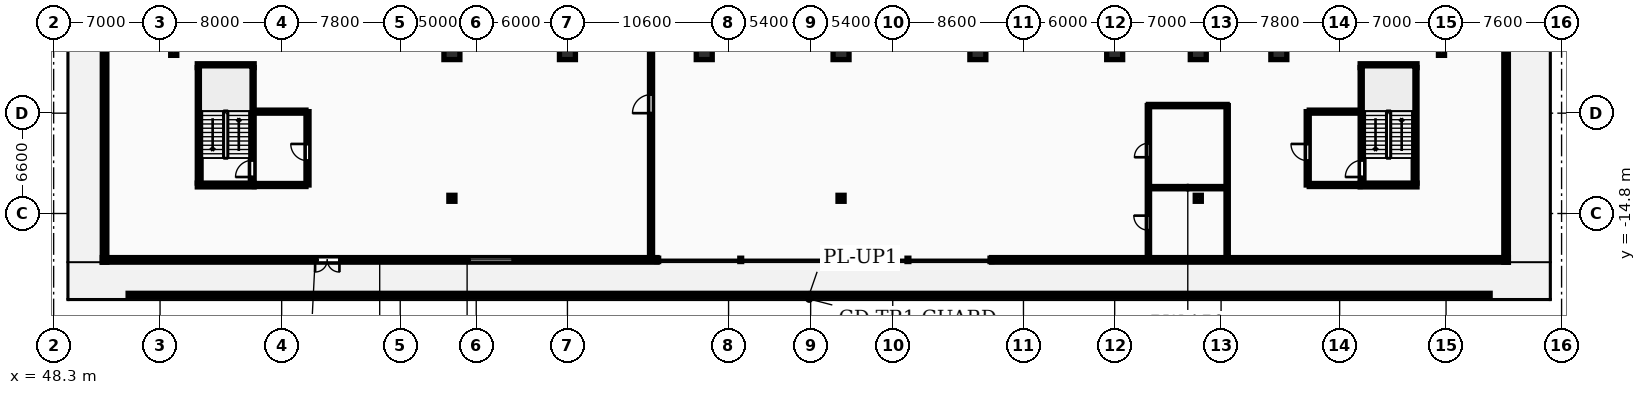
"""IFC4 building model, lengths in metres.
Left out: names, types, materials, properties, quantities, classifications, styles, units other than length and angle.
Written with IfcOpenShell. Run it as: python <this file> out.ifc"""

import sys

from ifc_helpers import new_model, si_unit, direction, frame, frame_2d, origin, origin_2d, place, context, subcontext, project, spatial, rectangle, i_section, extrude, element, fill, save


model = new_model("IFC4")
c1 = context("Model", 3, precision=1e-05, world=origin(), true_north=direction((0.0, 1.0)))
c2 = subcontext(c1, "Body", "Model", "MODEL_VIEW")
j1 = project(units=[si_unit("LENGTHUNIT", "METRE"), si_unit("PLANEANGLEUNIT", "RADIAN")], contexts=[c1])
p1 = place(None, origin())
s1 = spatial("IfcSite", under=j1, at=p1, CompositionType="ELEMENT")
p2 = place(p1, origin())
s2 = spatial("IfcBuilding", under=s1, at=p2, CompositionType="ELEMENT")
p3 = place(p2, frame((0.0, 0.0, 14.5)))
s3 = spatial("IfcBuildingStorey", under=s2, at=p3, CompositionType="ELEMENT", Elevation=14.5)
for number, where, z_axis, x_axis in (
    (1, (74.5, -4.2, 0.0), (0.0, 0.0, 1.0), (1.0, 0.0, 0.0)),
    (2, (82.1, -4.2, 0.0), (0.0, 0.0, 1.0), (1.0, 0.0, 0.0)),
    (3, (91.1, -4.2, 0.0), (0.0, 0.0, 1.0), (1.0, 0.0, 0.0)),
    (4, (100.1, -4.2, 0.0), (0.0, 0.0, 1.0), (1.0, 0.0, 0.0)),
    (5, (109.1, -4.2, 0.0), (0.0, 0.0, 1.0), (1.0, 0.0, 0.0)),
    (6, (118.1, -4.2, 0.0), (0.0, 0.0, 1.0), (1.0, 0.0, 0.0)),
    (7, (123.6, -4.2, 0.0), (0.0, 0.0, 1.0), (1.0, 0.0, 0.0)),
    (8, (128.9, -4.2, 0.0), (0.0, 0.0, 1.0), (1.0, 0.0, 0.0)),
):
    element("IfcColumn", number, at=place(p3, frame(where, z_axis=z_axis, x_axis=x_axis)), inside=s3, PredefinedType="COLUMN", context=c2, shape_type="SweptSolid", body=[
        extrude(rectangle(XDim=1.05, YDim=0.95, at=origin_2d()), origin(), (0.0, 0.0, 1.0), 4.5),
    ])
for number, where, z_axis, x_axis in (
    (9, (56.2, -4.2, 0.0), (0.0, 0.0, 1.0), (1.0, 0.0, 0.0)),
    (10, (139.6, -4.2, 0.0), (0.0, 0.0, 1.0), (1.0, 0.0, 0.0)),
    (11, (74.5, -13.8, 0.0), (0.0, 0.0, 1.0), (1.0, 0.0, 0.0)),
    (12, (100.1, -13.8, 0.0), (0.0, 0.0, 1.0), (1.0, 0.0, 0.0)),
    (13, (123.6, -13.8, 0.0), (0.0, 0.0, 1.0), (1.0, 0.0, 0.0)),
):
    element("IfcColumn", number, at=place(p3, frame(where, z_axis=z_axis, x_axis=x_axis)), inside=s3, PredefinedType="COLUMN", context=c2, shape_type="SweptSolid", body=[
        extrude(i_section(OverallWidth=0.399, OverallDepth=0.394, WebThickness=0.023, FlangeThickness=0.037, FilletRadius=0.015, at=origin_2d()), origin(), (0.0, 0.0, 1.0), 4.5),
    ])
p4 = place(p3, frame((51.5, -17.85, 0.0), z_axis=(0.0, 0.0, 1.0), x_axis=(1.0, 0.0, 0.0)))
e14 = element("IfcWall", 14, at=p4, inside=s3, PredefinedType="STANDARD", context=c2, shape_type="SweptSolid", body=[
    extrude(rectangle(XDim=36.5, YDim=0.3, at=frame_2d((18.25, 0.0))), origin(), (0.0, 0.0, 1.0), 4.18),
])
p5 = place(p4, frame((14.0, 0.0, 0.0)))
e15 = element("IfcOpeningElement", 15, at=p5, cuts=e14, PredefinedType="OPENING", context=c2, shape_type="SweptSolid", body=[
    extrude(rectangle(XDim=1.6, YDim=2.2, at=frame_2d((0.8, 1.1))), frame((0.0, 0.16, 0.0), z_axis=(0.0, -1.0, 0.0), x_axis=(1.0, 0.0, 0.0)), (0.0, 0.0, 1.0), 0.32),
])
p6 = place(p4, frame((24.0, 0.0, 0.9)))
e16 = element("IfcOpeningElement", 16, at=p6, cuts=e14, PredefinedType="OPENING", context=c2, shape_type="SweptSolid", body=[
    extrude(rectangle(XDim=3.0, YDim=2.6, at=frame_2d((1.5, 1.3))), frame((0.0, 0.16, 0.0), z_axis=(0.0, -1.0, 0.0), x_axis=(1.0, 0.0, 0.0)), (0.0, 0.0, 1.0), 0.32),
])
p7 = place(p3, frame((110.0, -17.85, 0.0), z_axis=(0.0, 0.0, 1.0), x_axis=(1.0, 0.0, 0.0)))
e17 = element("IfcWall", 17, at=p7, inside=s3, PredefinedType="STANDARD", context=c2, shape_type="SweptSolid", body=[
    extrude(rectangle(XDim=34.0, YDim=0.3, at=frame_2d((17.0, 0.0))), origin(), (0.0, 0.0, 1.0), 4.18),
])
p8 = place(p3, frame((51.65, 101.7, 0.0), z_axis=(0.0, 0.0, 1.0), x_axis=(0.0, -1.0, 0.0)))
e18 = element("IfcWall", 18, at=p8, inside=s3, PredefinedType="STANDARD", context=c2, shape_type="SweptSolid", body=[
    extrude(rectangle(XDim=119.7, YDim=0.3, at=frame_2d((59.85, 0.0))), origin(), (0.0, 0.0, 1.0), 4.18),
])
p9 = place(p8, frame((12.0, 0.0, 0.0)))
e19 = element("IfcOpeningElement", 19, at=p9, cuts=e18, PredefinedType="OPENING", context=c2, shape_type="SweptSolid", body=[
    extrude(rectangle(XDim=1.6, YDim=2.2, at=frame_2d((0.8, 1.1))), frame((0.0, 0.16, 0.0), z_axis=(0.0, -1.0, 0.0), x_axis=(1.0, 0.0, 0.0)), (0.0, 0.0, 1.0), 0.32),
])
p10 = place(p3, frame((143.85, -18.0, 0.0), z_axis=(0.0, 0.0, 1.0), x_axis=(0.0, 1.0, 0.0)))
e20 = element("IfcWall", 20, at=p10, inside=s3, PredefinedType="STANDARD", context=c2, shape_type="SweptSolid", body=[
    extrude(rectangle(XDim=119.7, YDim=0.3, at=frame_2d((59.85, 0.0))), origin(), (0.0, 0.0, 1.0), 4.18),
])
p11 = place(p10, frame((20.0, 0.0, 0.0)))
e21 = element("IfcOpeningElement", 21, at=p11, cuts=e20, PredefinedType="OPENING", context=c2, shape_type="SweptSolid", body=[
    extrude(rectangle(XDim=1.6, YDim=2.2, at=frame_2d((0.8, 1.1))), frame((0.0, 0.16, 0.0), z_axis=(0.0, -1.0, 0.0), x_axis=(1.0, 0.0, 0.0)), (0.0, 0.0, 1.0), 0.32),
])
p12 = place(p3, frame((53.2, -20.15, 0.0), z_axis=(0.0, 0.0, 1.0), x_axis=(1.0, 0.0, 0.0)))
e22 = element("IfcWall", 22, at=p12, inside=s3, PredefinedType="PARAPET", context=c2, shape_type="SweptSolid", body=[
    extrude(rectangle(XDim=89.6, YDim=0.2, at=frame_2d((44.8, 0.0))), origin(), (0.0, 0.0, 1.0), 0.65),
])
p13 = place(p3, frame((57.875, -12.8, 0.0), z_axis=(0.0, 0.0, 1.0), x_axis=(0.0, 1.0, 0.0)))
e23 = element("IfcWall", 23, at=p13, inside=s3, PredefinedType="SHEAR", context=c2, shape_type="SweptSolid", body=[
    extrude(rectangle(XDim=7.6, YDim=0.25, at=frame_2d((3.8, 0.0))), origin(), (0.0, 0.0, 1.0), 4.5),
])
for number, where, z_axis, x_axis in (
    (24, (57.75, -12.925, 0.0), (0.0, 0.0, 1.0), (1.0, 0.0, 0.0)),
    (25, (57.75, -5.075, 0.0), (0.0, 0.0, 1.0), (1.0, 0.0, 0.0)),
):
    element("IfcWall", number, at=place(p3, frame(where, z_axis=z_axis, x_axis=x_axis)), inside=s3, PredefinedType="SHEAR", context=c2, shape_type="SweptSolid", body=[
        extrude(rectangle(XDim=3.74, YDim=0.25, at=frame_2d((1.87, 0.0))), origin(), (0.0, 0.0, 1.0), 4.5),
    ])
p14 = place(p3, frame((61.365, -12.8, 0.0), z_axis=(0.0, 0.0, 1.0), x_axis=(0.0, 1.0, 0.0)))
e26 = element("IfcWall", 26, at=p14, inside=s3, PredefinedType="SHEAR", context=c2, shape_type="SweptSolid", body=[
    extrude(rectangle(XDim=7.6, YDim=0.25, at=frame_2d((3.8, 0.0))), origin(), (0.0, 0.0, 1.0), 4.5),
])
p15 = place(p14, frame((0.4, 0.0, 0.0)))
e27 = element("IfcOpeningElement", 27, at=p15, cuts=e26, PredefinedType="OPENING", context=c2, shape_type="SweptSolid", body=[
    extrude(rectangle(XDim=1.1, YDim=2.1, at=frame_2d((0.55, 1.05))), frame((0.0, 0.135, 0.0), z_axis=(0.0, -1.0, 0.0), x_axis=(1.0, 0.0, 0.0)), (0.0, 0.0, 1.0), 0.27),
])
p16 = place(p3, frame((65.0, -12.925, 0.0), z_axis=(0.0, 0.0, 1.0), x_axis=(0.0, 1.0, 0.0)))
e28 = element("IfcWall", 28, at=p16, inside=s3, PredefinedType="PARTITIONING", context=c2, shape_type="SweptSolid", body=[
    extrude(rectangle(XDim=4.825, YDim=0.2, at=frame_2d((2.413, 0.0))), origin(), (0.0, 0.0, 1.0), 4.18),
])
p17 = place(p16, frame((1.6, 0.0, 0.0)))
e29 = element("IfcOpeningElement", 29, at=p17, cuts=e28, PredefinedType="OPENING", context=c2, shape_type="SweptSolid", body=[
    extrude(rectangle(XDim=1.1, YDim=2.15, at=frame_2d((0.55, 1.075))), frame((0.0, 0.11, 0.0), z_axis=(0.0, -1.0, 0.0), x_axis=(1.0, 0.0, 0.0)), (0.0, 0.0, 1.0), 0.22),
])
for number, where, z_axis, x_axis in (
    (30, (61.5, -12.925, 0.0), (0.0, 0.0, 1.0), (1.0, 0.0, 0.0)),
    (31, (61.5, -8.1, 0.0), (0.0, 0.0, 1.0), (1.0, 0.0, 0.0)),
):
    element("IfcWall", number, at=place(p3, frame(where, z_axis=z_axis, x_axis=x_axis)), inside=s3, PredefinedType="PARTITIONING", context=c2, shape_type="SweptSolid", body=[
        extrude(rectangle(XDim=3.4, YDim=0.2, at=frame_2d((1.7, 0.0))), origin(), (0.0, 0.0, 1.0), 4.18),
    ])
p18 = place(p3, frame((134.375, -12.8, 0.0), z_axis=(0.0, 0.0, 1.0), x_axis=(0.0, 1.0, 0.0)))
e32 = element("IfcWall", 32, at=p18, inside=s3, PredefinedType="SHEAR", context=c2, shape_type="SweptSolid", body=[
    extrude(rectangle(XDim=7.6, YDim=0.25, at=frame_2d((3.8, 0.0))), origin(), (0.0, 0.0, 1.0), 4.5),
])
p19 = place(p18, frame((0.4, 0.0, 0.0)))
e33 = element("IfcOpeningElement", 33, at=p19, cuts=e32, PredefinedType="OPENING", context=c2, shape_type="SweptSolid", body=[
    extrude(rectangle(XDim=1.1, YDim=2.1, at=frame_2d((0.55, 1.05))), frame((0.0, 0.135, 0.0), z_axis=(0.0, -1.0, 0.0), x_axis=(1.0, 0.0, 0.0)), (0.0, 0.0, 1.0), 0.27),
])
p20 = place(p3, frame((137.865, -12.8, 0.0), z_axis=(0.0, 0.0, 1.0), x_axis=(0.0, 1.0, 0.0)))
e34 = element("IfcWall", 34, at=p20, inside=s3, PredefinedType="SHEAR", context=c2, shape_type="SweptSolid", body=[
    extrude(rectangle(XDim=7.6, YDim=0.25, at=frame_2d((3.8, 0.0))), origin(), (0.0, 0.0, 1.0), 4.5),
])
for number, where, z_axis, x_axis in (
    (35, (134.25, -12.925, 0.0), (0.0, 0.0, 1.0), (1.0, 0.0, 0.0)),
    (36, (134.25, -5.075, 0.0), (0.0, 0.0, 1.0), (1.0, 0.0, 0.0)),
):
    element("IfcWall", number, at=place(p3, frame(where, z_axis=z_axis, x_axis=x_axis)), inside=s3, PredefinedType="SHEAR", context=c2, shape_type="SweptSolid", body=[
        extrude(rectangle(XDim=3.74, YDim=0.25, at=frame_2d((1.87, 0.0))), origin(), (0.0, 0.0, 1.0), 4.5),
    ])
p21 = place(p3, frame((130.8, -12.925, 0.0), z_axis=(0.0, 0.0, 1.0), x_axis=(0.0, 1.0, 0.0)))
e37 = element("IfcWall", 37, at=p21, inside=s3, PredefinedType="PARTITIONING", context=c2, shape_type="SweptSolid", body=[
    extrude(rectangle(XDim=4.825, YDim=0.2, at=frame_2d((2.413, 0.0))), origin(), (0.0, 0.0, 1.0), 4.18),
])
p22 = place(p21, frame((1.6, 0.0, 0.0)))
e38 = element("IfcOpeningElement", 38, at=p22, cuts=e37, PredefinedType="OPENING", context=c2, shape_type="SweptSolid", body=[
    extrude(rectangle(XDim=1.1, YDim=2.15, at=frame_2d((0.55, 1.075))), frame((0.0, 0.11, 0.0), z_axis=(0.0, -1.0, 0.0), x_axis=(1.0, 0.0, 0.0)), (0.0, 0.0, 1.0), 0.22),
])
for number, where, z_axis, x_axis in (
    (39, (130.9, -12.925, 0.0), (0.0, 0.0, 1.0), (1.0, 0.0, 0.0)),
    (40, (130.9, -8.1, 0.0), (0.0, 0.0, 1.0), (1.0, 0.0, 0.0)),
):
    element("IfcWall", number, at=place(p3, frame(where, z_axis=z_axis, x_axis=x_axis)), inside=s3, PredefinedType="PARTITIONING", context=c2, shape_type="SweptSolid", body=[
        extrude(rectangle(XDim=3.35, YDim=0.2, at=frame_2d((1.675, 0.0))), origin(), (0.0, 0.0, 1.0), 4.18),
    ])
p23 = place(p3, frame((87.6, -17.7, 0.0), z_axis=(0.0, 0.0, 1.0), x_axis=(0.0, 1.0, 0.0)))
e41 = element("IfcWall", 41, at=p23, inside=s3, PredefinedType="PARTITIONING", context=c2, shape_type="SweptSolid", body=[
    extrude(rectangle(XDim=35.95, YDim=0.2, at=frame_2d((17.975, 0.0))), origin(), (0.0, 0.0, 1.0), 4.18),
])
p24 = place(p23, frame((9.5, 0.0, 0.0)))
e42 = element("IfcOpeningElement", 42, at=p24, cuts=e41, PredefinedType="OPENING", context=c2, shape_type="SweptSolid", body=[
    extrude(rectangle(XDim=1.22, YDim=2.18, at=frame_2d((0.61, 1.09))), frame((0.0, 0.11, 0.0), z_axis=(0.0, -1.0, 0.0), x_axis=(1.0, 0.0, 0.0)), (0.0, 0.0, 1.0), 0.22),
])
p25 = place(p3, frame((120.32, -17.7, 0.0), z_axis=(0.0, 0.0, 1.0), x_axis=(0.0, 1.0, 0.0)))
e43 = element("IfcWall", 43, at=p25, inside=s3, PredefinedType="PARTITIONING", context=c2, shape_type="SweptSolid", body=[
    extrude(rectangle(XDim=10.0, YDim=0.15, at=frame_2d((5.0, 0.0))), origin(), (0.0, 0.0, 1.0), 4.18),
])
p26 = place(p25, frame((1.8, 0.0, 0.0)))
e44 = element("IfcOpeningElement", 44, at=p26, cuts=e43, PredefinedType="OPENING", context=c2, shape_type="SweptSolid", body=[
    extrude(rectangle(XDim=0.96, YDim=2.1, at=frame_2d((0.48, 1.05))), frame((0.0, 0.085, 0.0), z_axis=(0.0, -1.0, 0.0), x_axis=(1.0, 0.0, 0.0)), (0.0, 0.0, 1.0), 0.17),
])
p27 = place(p25, frame((6.6, 0.0, 0.0)))
e45 = element("IfcOpeningElement", 45, at=p27, cuts=e43, PredefinedType="OPENING", context=c2, shape_type="SweptSolid", body=[
    extrude(rectangle(XDim=0.92, YDim=2.08, at=frame_2d((0.46, 1.04))), frame((0.0, 0.085, 0.0), z_axis=(0.0, -1.0, 0.0), x_axis=(1.0, 0.0, 0.0)), (0.0, 0.0, 1.0), 0.17),
])
for number, where, z_axis, x_axis in (
    (46, (120.32, -13.1, 0.0), (0.0, 0.0, 1.0), (1.0, 0.0, 0.0)),
    (47, (120.32, -7.7, 0.0), (0.0, 0.0, 1.0), (1.0, 0.0, 0.0)),
):
    element("IfcWall", number, at=place(p3, frame(where, z_axis=z_axis, x_axis=x_axis)), inside=s3, PredefinedType="PARTITIONING", context=c2, shape_type="SweptSolid", body=[
        extrude(rectangle(XDim=5.18, YDim=0.15, at=frame_2d((2.59, 0.0))), origin(), (0.0, 0.0, 1.0), 4.18),
    ])
p28 = place(p3, frame((125.5, -17.7, 0.0), z_axis=(0.0, 0.0, 1.0), x_axis=(0.0, 1.0, 0.0)))
e48 = element("IfcWall", 48, at=p28, inside=s3, PredefinedType="PARTITIONING", context=c2, shape_type="SweptSolid", body=[
    extrude(rectangle(XDim=10.0, YDim=0.15, at=frame_2d((5.0, 0.0))), origin(), (0.0, 0.0, 1.0), 4.18),
])
p29 = place(p5, frame((1.6, 0.0, 0.0), z_axis=(0.0, 0.0, 1.0), x_axis=(-1.0, 0.0, 0.0)))
e49 = element("IfcDoor", 49, at=p29, inside=s3, OperationType="DOUBLE_DOOR_SINGLE_SWING", PredefinedType="DOOR", context=c2, shape_type="SweptSolid", body=[
    extrude(rectangle(XDim=1.6, YDim=2.2, at=frame_2d((0.8, 1.1))), frame((0.0, 0.025, 0.0), z_axis=(0.0, -1.0, 0.0), x_axis=(1.0, 0.0, 0.0)), (0.0, 0.0, 1.0), 0.05),
])
fill(e15, e49)
p30 = place(p6, origin())
e50 = element("IfcWindow", 50, at=p30, inside=s3, PartitioningType="TRIPLE_PANEL_VERTICAL", PredefinedType="WINDOW", context=c2, shape_type="SweptSolid", body=[
    extrude(rectangle(XDim=3.0, YDim=2.6, at=frame_2d((1.5, 1.3))), frame((0.0, 0.03, 0.0), z_axis=(0.0, -1.0, 0.0), x_axis=(1.0, 0.0, 0.0)), (0.0, 0.0, 1.0), 0.06),
])
fill(e16, e50)
p31 = place(p15, origin())
e51 = element("IfcDoor", 51, at=p31, inside=s3, OperationType="SINGLE_SWING_LEFT", PredefinedType="DOOR", context=c2, shape_type="SweptSolid", body=[
    extrude(rectangle(XDim=1.1, YDim=2.1, at=frame_2d((0.55, 1.05))), frame((0.0, 0.025, 0.0), z_axis=(0.0, -1.0, 0.0), x_axis=(1.0, 0.0, 0.0)), (0.0, 0.0, 1.0), 0.05),
])
fill(e27, e51)
p32 = place(p17, origin())
e52 = element("IfcDoor", 52, at=p32, inside=s3, OperationType="SINGLE_SWING_RIGHT", PredefinedType="DOOR", context=c2, shape_type="SweptSolid", body=[
    extrude(rectangle(XDim=1.1, YDim=2.15, at=frame_2d((0.55, 1.075))), frame((0.0, 0.025, 0.0), z_axis=(0.0, -1.0, 0.0), x_axis=(1.0, 0.0, 0.0)), (0.0, 0.0, 1.0), 0.05),
])
fill(e29, e52)
p33 = place(p19, origin())
e53 = element("IfcDoor", 53, at=p33, inside=s3, OperationType="SINGLE_SWING_LEFT", PredefinedType="DOOR", context=c2, shape_type="SweptSolid", body=[
    extrude(rectangle(XDim=1.1, YDim=2.1, at=frame_2d((0.55, 1.05))), frame((0.0, 0.025, 0.0), z_axis=(0.0, -1.0, 0.0), x_axis=(1.0, 0.0, 0.0)), (0.0, 0.0, 1.0), 0.05),
])
fill(e33, e53)
p34 = place(p22, origin())
e54 = element("IfcDoor", 54, at=p34, inside=s3, OperationType="SINGLE_SWING_RIGHT", PredefinedType="DOOR", context=c2, shape_type="SweptSolid", body=[
    extrude(rectangle(XDim=1.1, YDim=2.15, at=frame_2d((0.55, 1.075))), frame((0.0, 0.025, 0.0), z_axis=(0.0, -1.0, 0.0), x_axis=(1.0, 0.0, 0.0)), (0.0, 0.0, 1.0), 0.05),
])
fill(e38, e54)
p35 = place(p24, origin())
e55 = element("IfcDoor", 55, at=p35, inside=s3, OperationType="SINGLE_SWING_LEFT", PredefinedType="DOOR", context=c2, shape_type="SweptSolid", body=[
    extrude(rectangle(XDim=1.22, YDim=2.18, at=frame_2d((0.61, 1.09))), frame((0.0, 0.025, 0.0), z_axis=(0.0, -1.0, 0.0), x_axis=(1.0, 0.0, 0.0)), (0.0, 0.0, 1.0), 0.05),
])
fill(e42, e55)
p36 = place(p26, origin())
e56 = element("IfcDoor", 56, at=p36, inside=s3, OperationType="SINGLE_SWING_RIGHT", PredefinedType="DOOR", context=c2, shape_type="SweptSolid", body=[
    extrude(rectangle(XDim=0.96, YDim=2.1, at=frame_2d((0.48, 1.05))), frame((0.0, 0.025, 0.0), z_axis=(0.0, -1.0, 0.0), x_axis=(1.0, 0.0, 0.0)), (0.0, 0.0, 1.0), 0.05),
])
fill(e44, e56)
p37 = place(p27, origin())
e57 = element("IfcDoor", 57, at=p37, inside=s3, OperationType="SINGLE_SWING_LEFT", PredefinedType="DOOR", context=c2, shape_type="SweptSolid", body=[
    extrude(rectangle(XDim=0.92, YDim=2.08, at=frame_2d((0.46, 1.04))), frame((0.0, 0.025, 0.0), z_axis=(0.0, -1.0, 0.0), x_axis=(1.0, 0.0, 0.0)), (0.0, 0.0, 1.0), 0.05),
])
fill(e45, e57)
save(model, sys.argv[1])
